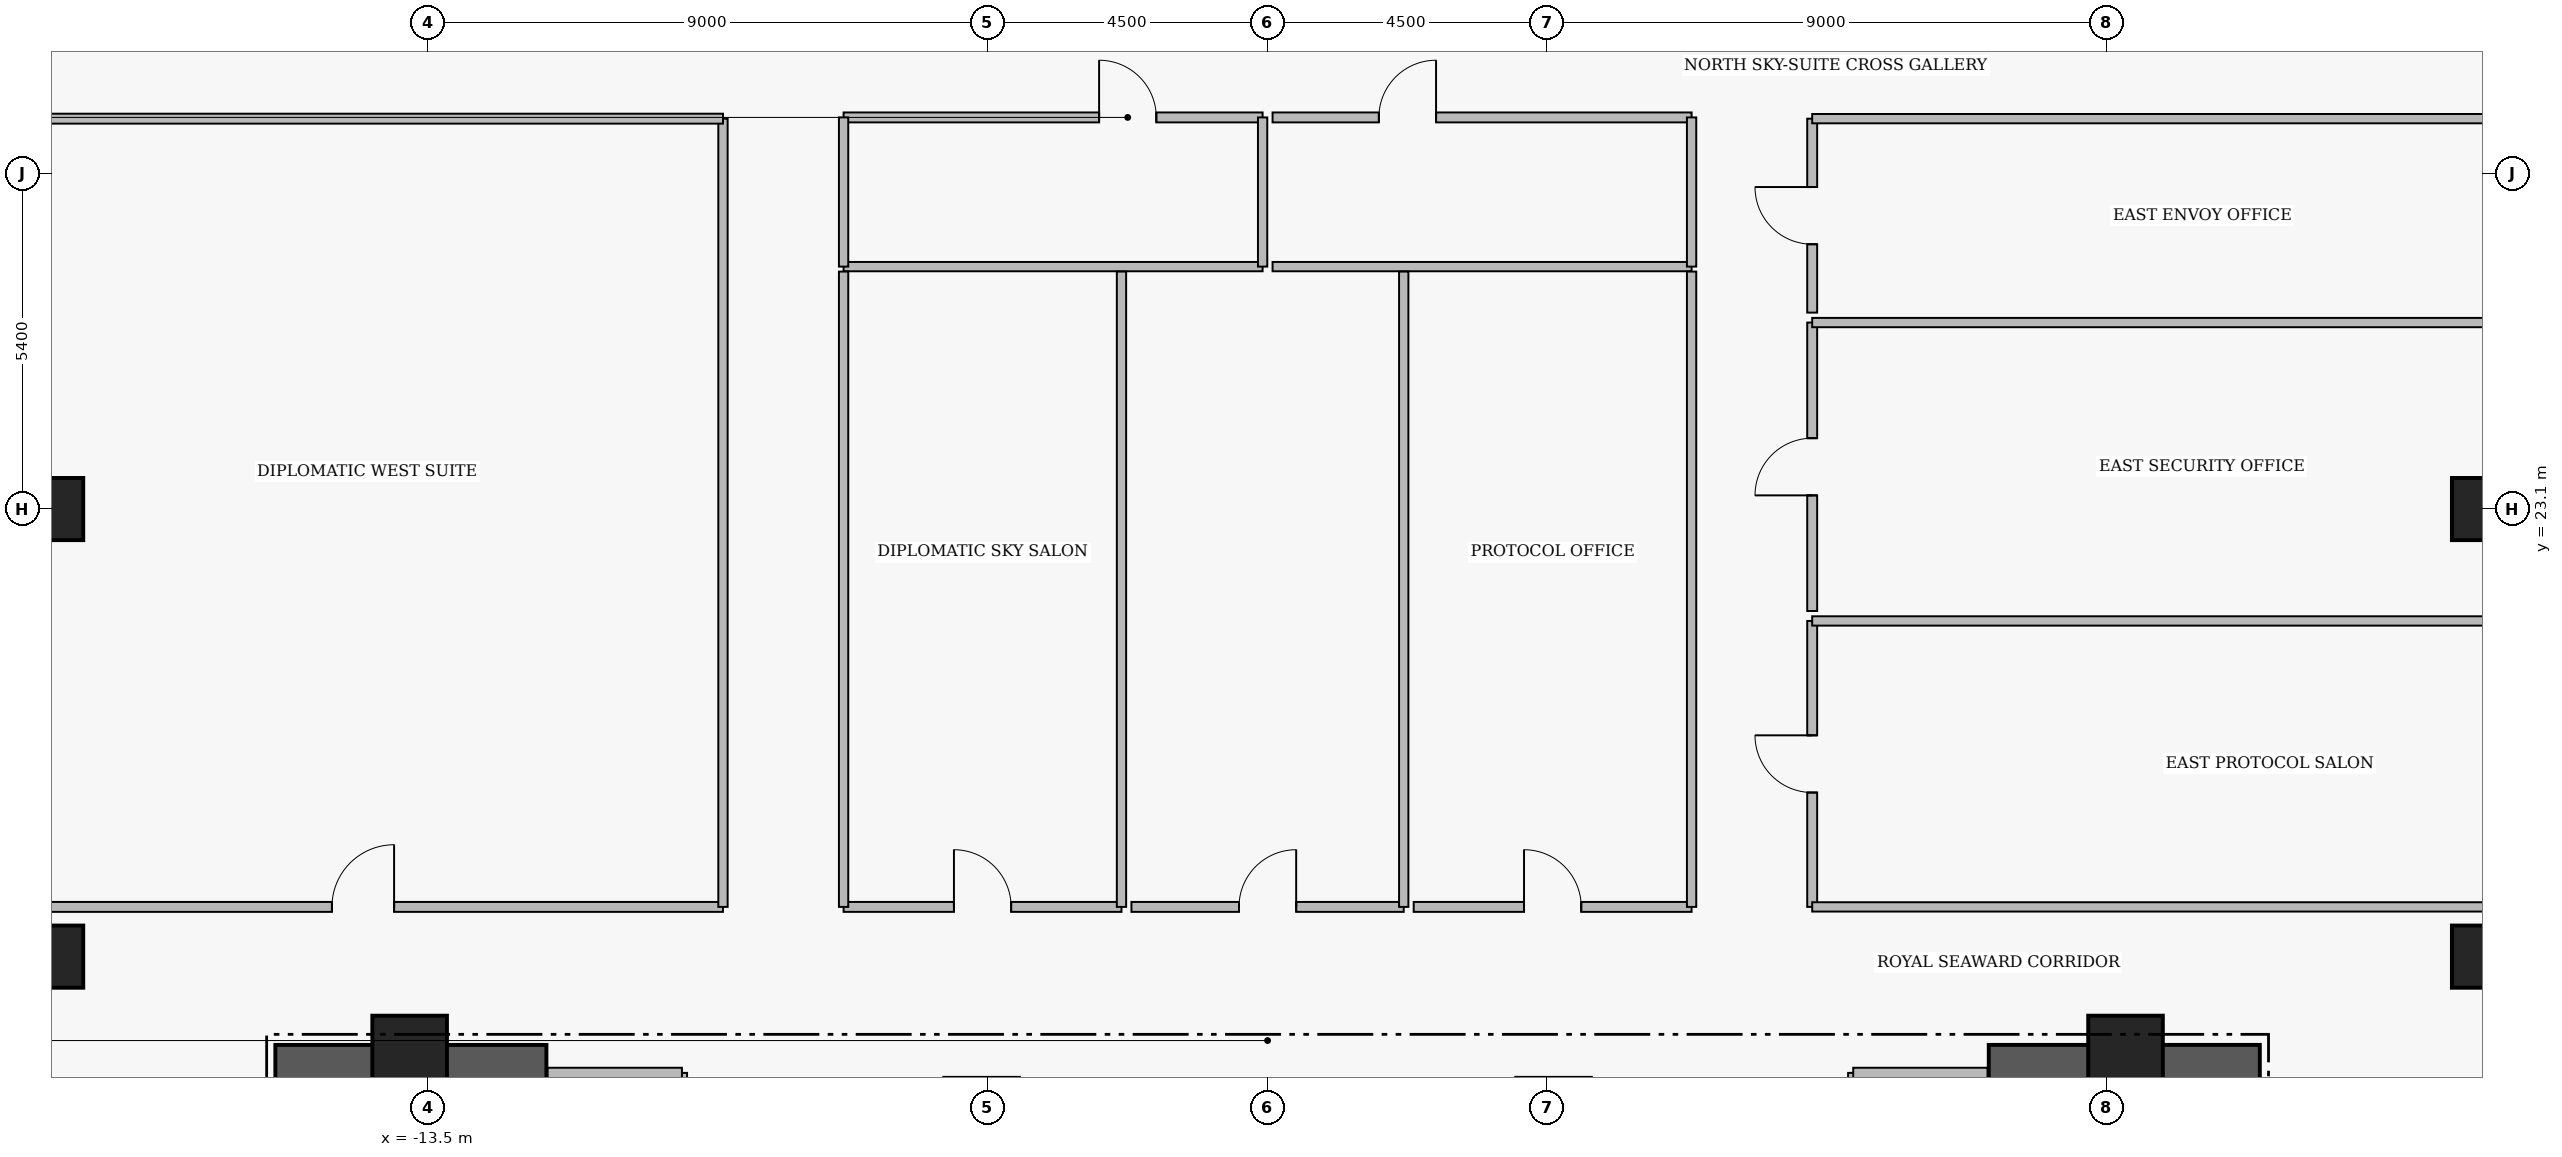
"""IFC4 building model, lengths in metres.
Left out: names, types, materials, properties, quantities, classifications, styles, units other than length and angle.
Written with IfcOpenShell. Run it as: python <this file> out.ifc"""

import sys

from ifc_helpers import new_model, si_unit, direction, frame, frame_2d, origin, origin_2d, place, context, subcontext, project, spatial, rectangle, extrude, element, fill, save


model = new_model("IFC4")
c1 = context("Model", 3, precision=1e-05, world=origin(), true_north=direction((0.0, 1.0)))
c2 = subcontext(c1, "Body", "Model", "MODEL_VIEW")
j1 = project(units=[si_unit("LENGTHUNIT", "METRE"), si_unit("PLANEANGLEUNIT", "RADIAN")], contexts=[c1])
p1 = place(None, origin())
s1 = spatial("IfcSite", under=j1, at=p1, CompositionType="ELEMENT")
p2 = place(p1, origin())
s2 = spatial("IfcBuilding", under=s1, at=p2, CompositionType="ELEMENT")
p3 = place(p2, frame((0.0, 0.0, 280.35)))
s3 = spatial("IfcBuildingStorey", under=s2, at=p3, CompositionType="ELEMENT", Elevation=280.35)
for number, where, z_axis, x_axis in (
    (1, (-15.96, 14.205, 0.0), (0.0, 0.0, 1.0), (1.0, 0.0, 0.0)),
    (2, (11.6, 14.205, 0.0), (0.0, 0.0, 1.0), (1.0, 0.0, 0.0)),
):
    element("IfcWall", number, at=place(p3, frame(where, z_axis=z_axis, x_axis=x_axis)), inside=s3, PredefinedType="SHEAR", context=c2, shape_type="SweptSolid", body=[
        extrude(rectangle(XDim=4.36, YDim=0.55, at=frame_2d((2.18, 0.0))), origin(), (0.0, 0.0, 1.0), 3.51),
    ])
for number, where, z_axis, x_axis in (
    (3, (-13.8, 14.35, 0.0), (0.0, 0.0, 1.0), (1.0, 0.0, 0.0)),
    (4, (-4.6, 13.35, 0.0), (0.0, 0.0, 1.0), (1.0, 0.0, 0.0)),
    (5, (4.6, 13.35, 0.0), (0.0, 0.0, 1.0), (1.0, 0.0, 0.0)),
    (6, (13.8, 14.35, 0.0), (0.0, 0.0, 1.0), (1.0, 0.0, 0.0)),
):
    element("IfcColumn", number, at=place(p3, frame(where, z_axis=z_axis, x_axis=x_axis)), inside=s3, PredefinedType="COLUMN", context=c2, shape_type="SweptSolid", body=[
        extrude(rectangle(XDim=1.2, YDim=1.2, at=origin_2d()), origin(), (0.0, 0.0, 1.0), 3.7),
    ])
for number, where, z_axis, x_axis in (
    (7, (-19.55, 15.9, 0.0), (0.0, 0.0, 1.0), (1.0, 0.0, 0.0)),
    (8, (-19.55, 23.1, 0.0), (0.0, 0.0, 1.0), (1.0, 0.0, 0.0)),
    (9, (19.55, 15.9, 0.0), (0.0, 0.0, 1.0), (1.0, 0.0, 0.0)),
    (10, (19.55, 23.1, 0.0), (0.0, 0.0, 1.0), (1.0, 0.0, 0.0)),
):
    element("IfcColumn", number, at=place(p3, frame(where, z_axis=z_axis, x_axis=x_axis)), inside=s3, PredefinedType="COLUMN", context=c2, shape_type="SweptSolid", body=[
        extrude(rectangle(XDim=1.0, YDim=1.0, at=origin_2d()), origin(), (0.0, 0.0, 1.0), 3.7),
    ])
p4 = place(p3, frame((-6.82, 29.4, 0.0), z_axis=(0.0, 0.0, 1.0), x_axis=(1.0, 0.0, 0.0)))
e11 = element("IfcWall", 11, at=p4, inside=s3, PredefinedType="PARTITIONING", context=c2, shape_type="SweptSolid", body=[
    extrude(rectangle(XDim=6.74, YDim=0.16, at=frame_2d((3.37, 0.0))), origin(), (0.0, 0.0, 1.0), 3.48),
])
p5 = place(p4, frame((4.11, 0.0, 0.0)))
e12 = element("IfcOpeningElement", 12, at=p5, cuts=e11, PredefinedType="OPENING", context=c2, shape_type="SweptSolid", body=[
    extrude(rectangle(XDim=0.92, YDim=2.12, at=frame_2d((0.46, 1.06))), frame((0.0, 0.09, 0.0), z_axis=(0.0, -1.0, 0.0), x_axis=(1.0, 0.0, 0.0)), (0.0, 0.0, 1.0), 0.18),
])
p6 = place(p3, frame((0.08, 29.4, 0.0), z_axis=(0.0, 0.0, 1.0), x_axis=(1.0, 0.0, 0.0)))
e13 = element("IfcWall", 13, at=p6, inside=s3, PredefinedType="PARTITIONING", context=c2, shape_type="SweptSolid", body=[
    extrude(rectangle(XDim=6.74, YDim=0.16, at=frame_2d((3.37, 0.0))), origin(), (0.0, 0.0, 1.0), 3.48),
])
p7 = place(p6, frame((1.71, 0.0, 0.0)))
e14 = element("IfcOpeningElement", 14, at=p7, cuts=e13, PredefinedType="OPENING", context=c2, shape_type="SweptSolid", body=[
    extrude(rectangle(XDim=0.92, YDim=2.12, at=frame_2d((0.46, 1.06))), frame((0.0, 0.09, 0.0), z_axis=(0.0, -1.0, 0.0), x_axis=(1.0, 0.0, 0.0)), (0.0, 0.0, 1.0), 0.18),
])
p8 = place(p3, frame((-6.82, 16.7, 0.0), z_axis=(0.0, 0.0, 1.0), x_axis=(1.0, 0.0, 0.0)))
e15 = element("IfcWall", 15, at=p8, inside=s3, PredefinedType="PARTITIONING", context=c2, shape_type="SweptSolid", body=[
    extrude(rectangle(XDim=4.47, YDim=0.16, at=frame_2d((2.235, 0.0))), origin(), (0.0, 0.0, 1.0), 3.076),
])
p9 = place(p8, frame((1.775, 0.0, 0.0)))
e16 = element("IfcOpeningElement", 16, at=p9, cuts=e15, PredefinedType="OPENING", context=c2, shape_type="SweptSolid", body=[
    extrude(rectangle(XDim=0.92, YDim=2.12, at=frame_2d((0.46, 1.06))), frame((0.0, 0.09, 0.0), z_axis=(0.0, -1.0, 0.0), x_axis=(1.0, 0.0, 0.0)), (0.0, 0.0, 1.0), 0.18),
])
p10 = place(p3, frame((-2.19, 16.7, 0.0), z_axis=(0.0, 0.0, 1.0), x_axis=(1.0, 0.0, 0.0)))
e17 = element("IfcWall", 17, at=p10, inside=s3, PredefinedType="PARTITIONING", context=c2, shape_type="SweptSolid", body=[
    extrude(rectangle(XDim=4.38, YDim=0.16, at=frame_2d((2.19, 0.0))), origin(), (0.0, 0.0, 1.0), 3.076),
])
p11 = place(p10, frame((1.73, 0.0, 0.0)))
e18 = element("IfcOpeningElement", 18, at=p11, cuts=e17, PredefinedType="OPENING", context=c2, shape_type="SweptSolid", body=[
    extrude(rectangle(XDim=0.92, YDim=2.12, at=frame_2d((0.46, 1.06))), frame((0.0, 0.09, 0.0), z_axis=(0.0, -1.0, 0.0), x_axis=(1.0, 0.0, 0.0)), (0.0, 0.0, 1.0), 0.18),
])
p12 = place(p3, frame((2.35, 16.7, 0.0), z_axis=(0.0, 0.0, 1.0), x_axis=(1.0, 0.0, 0.0)))
e19 = element("IfcWall", 19, at=p12, inside=s3, PredefinedType="PARTITIONING", context=c2, shape_type="SweptSolid", body=[
    extrude(rectangle(XDim=4.47, YDim=0.16, at=frame_2d((2.235, 0.0))), origin(), (0.0, 0.0, 1.0), 3.076),
])
p13 = place(p12, frame((1.775, 0.0, 0.0)))
e20 = element("IfcOpeningElement", 20, at=p13, cuts=e19, PredefinedType="OPENING", context=c2, shape_type="SweptSolid", body=[
    extrude(rectangle(XDim=0.92, YDim=2.12, at=frame_2d((0.46, 1.06))), frame((0.0, 0.09, 0.0), z_axis=(0.0, -1.0, 0.0), x_axis=(1.0, 0.0, 0.0)), (0.0, 0.0, 1.0), 0.18),
])
p14 = place(p3, frame((8.76, 16.7, 0.0), z_axis=(0.0, 0.0, 1.0), x_axis=(0.0, 1.0, 0.0)))
e21 = element("IfcWall", 21, at=p14, inside=s3, PredefinedType="PARTITIONING", context=c2, shape_type="SweptSolid", body=[
    extrude(rectangle(XDim=4.6, YDim=0.16, at=frame_2d((2.3, 0.0))), origin(), (0.0, 0.0, 1.0), 3.48),
])
p15 = place(p14, frame((1.84, 0.0, 0.0)))
e22 = element("IfcOpeningElement", 22, at=p15, cuts=e21, PredefinedType="OPENING", context=c2, shape_type="SweptSolid", body=[
    extrude(rectangle(XDim=0.92, YDim=2.12, at=frame_2d((0.46, 1.06))), frame((0.0, 0.09, 0.0), z_axis=(0.0, -1.0, 0.0), x_axis=(1.0, 0.0, 0.0)), (0.0, 0.0, 1.0), 0.18),
])
p16 = place(p3, frame((8.76, 21.46, 0.0), z_axis=(0.0, 0.0, 1.0), x_axis=(0.0, 1.0, 0.0)))
e23 = element("IfcWall", 23, at=p16, inside=s3, PredefinedType="PARTITIONING", context=c2, shape_type="SweptSolid", body=[
    extrude(rectangle(XDim=4.64, YDim=0.16, at=frame_2d((2.32, 0.0))), origin(), (0.0, 0.0, 1.0), 3.48),
])
p17 = place(p16, frame((1.86, 0.0, 0.0)))
e24 = element("IfcOpeningElement", 24, at=p17, cuts=e23, PredefinedType="OPENING", context=c2, shape_type="SweptSolid", body=[
    extrude(rectangle(XDim=0.92, YDim=2.12, at=frame_2d((0.46, 1.06))), frame((0.0, 0.09, 0.0), z_axis=(0.0, -1.0, 0.0), x_axis=(1.0, 0.0, 0.0)), (0.0, 0.0, 1.0), 0.18),
])
p18 = place(p3, frame((8.76, 26.26, 0.0), z_axis=(0.0, 0.0, 1.0), x_axis=(0.0, 1.0, 0.0)))
e25 = element("IfcWall", 25, at=p18, inside=s3, PredefinedType="PARTITIONING", context=c2, shape_type="SweptSolid", body=[
    extrude(rectangle(XDim=3.12, YDim=0.16, at=frame_2d((1.56, 0.0))), origin(), (0.0, 0.0, 1.0), 3.48),
])
p19 = place(p18, frame((1.1, 0.0, 0.0)))
e26 = element("IfcOpeningElement", 26, at=p19, cuts=e25, PredefinedType="OPENING", context=c2, shape_type="SweptSolid", body=[
    extrude(rectangle(XDim=0.92, YDim=2.12, at=frame_2d((0.46, 1.06))), frame((0.0, 0.09, 0.0), z_axis=(0.0, -1.0, 0.0), x_axis=(1.0, 0.0, 0.0)), (0.0, 0.0, 1.0), 0.18),
])
p20 = place(p3, frame((-22.64, 16.7, 0.0), z_axis=(0.0, 0.0, 1.0), x_axis=(1.0, 0.0, 0.0)))
e27 = element("IfcWall", 27, at=p20, inside=s3, PredefinedType="PARTITIONING", context=c2, shape_type="SweptSolid", body=[
    extrude(rectangle(XDim=13.88, YDim=0.16, at=frame_2d((6.94, 0.0))), origin(), (0.0, 0.0, 1.0), 3.076),
])
p21 = place(p20, frame((7.59, 0.0, 0.0)))
e28 = element("IfcOpeningElement", 28, at=p21, cuts=e27, PredefinedType="OPENING", context=c2, shape_type="SweptSolid", body=[
    extrude(rectangle(XDim=1.0, YDim=2.15, at=frame_2d((0.5, 1.075))), frame((0.0, 0.09, 0.0), z_axis=(0.0, -1.0, 0.0), x_axis=(1.0, 0.0, 0.0)), (0.0, 0.0, 1.0), 0.18),
])
p22 = place(p3, frame((-9.42, 11.07, 0.0), z_axis=(0.0, 0.0, 1.0), x_axis=(0.0, 1.0, 0.0)))
e29 = element("IfcWall", 29, at=p22, inside=s3, PredefinedType="PARTITIONING", context=c2, shape_type="SweptSolid", body=[
    extrude(rectangle(XDim=2.96, YDim=0.165, at=frame_2d((1.48, 0.0))), origin(), (0.0, 0.0, 1.0), 3.48),
])
p23 = place(p3, frame((-11.58, 14.03, 0.0), z_axis=(0.0, 0.0, 1.0), x_axis=(1.0, 0.0, 0.0)))
e30 = element("IfcWall", 30, at=p23, inside=s3, PredefinedType="PARTITIONING", context=c2, shape_type="SweptSolid", body=[
    extrude(rectangle(XDim=2.16, YDim=0.165, at=frame_2d((1.08, 0.0))), origin(), (0.0, 0.0, 1.0), 3.48),
])
p24 = place(p3, frame((9.42, 11.07, 0.0), z_axis=(0.0, 0.0, 1.0), x_axis=(0.0, 1.0, 0.0)))
e31 = element("IfcWall", 31, at=p24, inside=s3, PredefinedType="PARTITIONING", context=c2, shape_type="SweptSolid", body=[
    extrude(rectangle(XDim=2.96, YDim=0.165, at=frame_2d((1.48, 0.0))), origin(), (0.0, 0.0, 1.0), 3.48),
])
p25 = place(p3, frame((9.42, 14.03, 0.0), z_axis=(0.0, 0.0, 1.0), x_axis=(1.0, 0.0, 0.0)))
e32 = element("IfcWall", 32, at=p25, inside=s3, PredefinedType="PARTITIONING", context=c2, shape_type="SweptSolid", body=[
    extrude(rectangle(XDim=2.16, YDim=0.165, at=frame_2d((1.08, 0.0))), origin(), (0.0, 0.0, 1.0), 3.48),
])
p26 = place(p3, frame((-6.82, 27.0, 0.0), z_axis=(0.0, 0.0, 1.0), x_axis=(1.0, 0.0, 0.0)))
e33 = element("IfcWall", 33, at=p26, inside=s3, PredefinedType="PARTITIONING", context=c2, shape_type="SweptSolid", body=[
    extrude(rectangle(XDim=6.74, YDim=0.15, at=frame_2d((3.37, 0.0))), origin(), (0.0, 0.0, 1.0), 3.48),
])
for number, where, z_axis, x_axis in (
    (34, (-6.82, 27.0, 0.0), (0.0, 0.0, 1.0), (0.0, 1.0, 0.0)),
    (35, (-0.08, 27.0, 0.0), (0.0, 0.0, 1.0), (0.0, 1.0, 0.0)),
):
    element("IfcWall", number, at=place(p3, frame(where, z_axis=z_axis, x_axis=x_axis)), inside=s3, PredefinedType="PARTITIONING", context=c2, shape_type="SweptSolid", body=[
        extrude(rectangle(XDim=2.4, YDim=0.15, at=frame_2d((1.2, 0.0))), origin(), (0.0, 0.0, 1.0), 3.48),
    ])
p27 = place(p3, frame((0.08, 27.0, 0.0), z_axis=(0.0, 0.0, 1.0), x_axis=(1.0, 0.0, 0.0)))
e36 = element("IfcWall", 36, at=p27, inside=s3, PredefinedType="PARTITIONING", context=c2, shape_type="SweptSolid", body=[
    extrude(rectangle(XDim=6.74, YDim=0.15, at=frame_2d((3.37, 0.0))), origin(), (0.0, 0.0, 1.0), 3.48),
])
p28 = place(p3, frame((6.82, 27.0, 0.0), z_axis=(0.0, 0.0, 1.0), x_axis=(0.0, 1.0, 0.0)))
e37 = element("IfcWall", 37, at=p28, inside=s3, PredefinedType="PARTITIONING", context=c2, shape_type="SweptSolid", body=[
    extrude(rectangle(XDim=2.4, YDim=0.15, at=frame_2d((1.2, 0.0))), origin(), (0.0, 0.0, 1.0), 3.48),
])
for number, where, z_axis, x_axis in (
    (38, (-6.82, 16.7, 0.0), (0.0, 0.0, 1.0), (0.0, 1.0, 0.0)),
    (39, (-2.35, 16.7, 0.0), (0.0, 0.0, 1.0), (0.0, 1.0, 0.0)),
    (40, (2.19, 16.7, 0.0), (0.0, 0.0, 1.0), (0.0, 1.0, 0.0)),
    (41, (6.82, 16.7, 0.0), (0.0, 0.0, 1.0), (0.0, 1.0, 0.0)),
):
    element("IfcWall", number, at=place(p3, frame(where, z_axis=z_axis, x_axis=x_axis)), inside=s3, PredefinedType="PARTITIONING", context=c2, shape_type="SweptSolid", body=[
        extrude(rectangle(XDim=10.22, YDim=0.15, at=frame_2d((5.11, 0.0))), origin(), (0.0, 0.0, 1.0), 3.48),
    ])
p29 = place(p3, frame((8.76, 16.7, 0.0), z_axis=(0.0, 0.0, 1.0), x_axis=(1.0, 0.0, 0.0)))
e42 = element("IfcWall", 42, at=p29, inside=s3, PredefinedType="PARTITIONING", context=c2, shape_type="SweptSolid", body=[
    extrude(rectangle(XDim=12.358, YDim=0.15, at=frame_2d((6.179, 0.0))), origin(), (0.0, 0.0, 1.0), 3.076),
])
p30 = place(p3, frame((8.76, 21.3, 0.0), z_axis=(0.0, 0.0, 1.0), x_axis=(1.0, 0.0, 0.0)))
e43 = element("IfcWall", 43, at=p30, inside=s3, PredefinedType="PARTITIONING", context=c2, shape_type="SweptSolid", body=[
    extrude(rectangle(XDim=12.902, YDim=0.15, at=frame_2d((6.451, 0.0))), origin(), (0.0, 0.0, 1.0), 3.48),
])
for number, where, z_axis, x_axis in (
    (44, (8.76, 26.1, 0.0), (0.0, 0.0, 1.0), (1.0, 0.0, 0.0)),
    (45, (8.76, 29.38, 0.0), (0.0, 0.0, 1.0), (1.0, 0.0, 0.0)),
):
    element("IfcWall", number, at=place(p3, frame(where, z_axis=z_axis, x_axis=x_axis)), inside=s3, PredefinedType="PARTITIONING", context=c2, shape_type="SweptSolid", body=[
        extrude(rectangle(XDim=11.38, YDim=0.15, at=frame_2d((5.69, 0.0))), origin(), (0.0, 0.0, 1.0), 3.48),
    ])
p31 = place(p3, frame((-8.76, 16.7, 0.0), z_axis=(0.0, 0.0, 1.0), x_axis=(0.0, 1.0, 0.0)))
e46 = element("IfcWall", 46, at=p31, inside=s3, PredefinedType="PARTITIONING", context=c2, shape_type="SweptSolid", body=[
    extrude(rectangle(XDim=12.68, YDim=0.15, at=frame_2d((6.34, 0.0))), origin(), (0.0, 0.0, 1.0), 3.48),
])
p32 = place(p3, frame((-22.64, 29.38, 0.0), z_axis=(0.0, 0.0, 1.0), x_axis=(1.0, 0.0, 0.0)))
e47 = element("IfcWall", 47, at=p32, inside=s3, PredefinedType="PARTITIONING", context=c2, shape_type="SweptSolid", body=[
    extrude(rectangle(XDim=13.88, YDim=0.16, at=frame_2d((6.94, 0.0))), origin(), (0.0, 0.0, 1.0), 3.48),
])
p33 = place(p5, origin())
e48 = element("IfcDoor", 48, at=p33, inside=s3, OperationType="SINGLE_SWING_LEFT", PredefinedType="DOOR", context=c2, shape_type="SweptSolid", body=[
    extrude(rectangle(XDim=0.92, YDim=2.12, at=frame_2d((0.46, 1.06))), frame((0.0, 0.025, 0.0), z_axis=(0.0, -1.0, 0.0), x_axis=(1.0, 0.0, 0.0)), (0.0, 0.0, 1.0), 0.05),
])
fill(e12, e48)
p34 = place(p7, origin())
e49 = element("IfcDoor", 49, at=p34, inside=s3, OperationType="SINGLE_SWING_RIGHT", PredefinedType="DOOR", context=c2, shape_type="SweptSolid", body=[
    extrude(rectangle(XDim=0.92, YDim=2.12, at=frame_2d((0.46, 1.06))), frame((0.0, 0.025, 0.0), z_axis=(0.0, -1.0, 0.0), x_axis=(1.0, 0.0, 0.0)), (0.0, 0.0, 1.0), 0.05),
])
fill(e14, e49)
p35 = place(p9, origin())
e50 = element("IfcDoor", 50, at=p35, inside=s3, OperationType="SINGLE_SWING_LEFT", PredefinedType="DOOR", context=c2, shape_type="SweptSolid", body=[
    extrude(rectangle(XDim=0.92, YDim=2.12, at=frame_2d((0.46, 1.06))), frame((0.0, 0.025, 0.0), z_axis=(0.0, -1.0, 0.0), x_axis=(1.0, 0.0, 0.0)), (0.0, 0.0, 1.0), 0.05),
])
fill(e16, e50)
p36 = place(p11, origin())
e51 = element("IfcDoor", 51, at=p36, inside=s3, OperationType="SINGLE_SWING_RIGHT", PredefinedType="DOOR", context=c2, shape_type="SweptSolid", body=[
    extrude(rectangle(XDim=0.92, YDim=2.12, at=frame_2d((0.46, 1.06))), frame((0.0, 0.025, 0.0), z_axis=(0.0, -1.0, 0.0), x_axis=(1.0, 0.0, 0.0)), (0.0, 0.0, 1.0), 0.05),
])
fill(e18, e51)
p37 = place(p13, origin())
e52 = element("IfcDoor", 52, at=p37, inside=s3, OperationType="SINGLE_SWING_LEFT", PredefinedType="DOOR", context=c2, shape_type="SweptSolid", body=[
    extrude(rectangle(XDim=0.92, YDim=2.12, at=frame_2d((0.46, 1.06))), frame((0.0, 0.025, 0.0), z_axis=(0.0, -1.0, 0.0), x_axis=(1.0, 0.0, 0.0)), (0.0, 0.0, 1.0), 0.05),
])
fill(e20, e52)
p38 = place(p15, origin())
e53 = element("IfcDoor", 53, at=p38, inside=s3, OperationType="SINGLE_SWING_RIGHT", PredefinedType="DOOR", context=c2, shape_type="SweptSolid", body=[
    extrude(rectangle(XDim=0.92, YDim=2.12, at=frame_2d((0.46, 1.06))), frame((0.0, 0.025, 0.0), z_axis=(0.0, -1.0, 0.0), x_axis=(1.0, 0.0, 0.0)), (0.0, 0.0, 1.0), 0.05),
])
fill(e22, e53)
p39 = place(p17, origin())
e54 = element("IfcDoor", 54, at=p39, inside=s3, OperationType="SINGLE_SWING_LEFT", PredefinedType="DOOR", context=c2, shape_type="SweptSolid", body=[
    extrude(rectangle(XDim=0.92, YDim=2.12, at=frame_2d((0.46, 1.06))), frame((0.0, 0.025, 0.0), z_axis=(0.0, -1.0, 0.0), x_axis=(1.0, 0.0, 0.0)), (0.0, 0.0, 1.0), 0.05),
])
fill(e24, e54)
p40 = place(p19, origin())
e55 = element("IfcDoor", 55, at=p40, inside=s3, OperationType="SINGLE_SWING_RIGHT", PredefinedType="DOOR", context=c2, shape_type="SweptSolid", body=[
    extrude(rectangle(XDim=0.92, YDim=2.12, at=frame_2d((0.46, 1.06))), frame((0.0, 0.025, 0.0), z_axis=(0.0, -1.0, 0.0), x_axis=(1.0, 0.0, 0.0)), (0.0, 0.0, 1.0), 0.05),
])
fill(e26, e55)
p41 = place(p21, origin())
e56 = element("IfcDoor", 56, at=p41, inside=s3, OperationType="SINGLE_SWING_RIGHT", PredefinedType="DOOR", context=c2, shape_type="SweptSolid", body=[
    extrude(rectangle(XDim=1.0, YDim=2.15, at=frame_2d((0.5, 1.075))), frame((0.0, 0.025, 0.0), z_axis=(0.0, -1.0, 0.0), x_axis=(1.0, 0.0, 0.0)), (0.0, 0.0, 1.0), 0.05),
])
fill(e28, e56)
save(model, sys.argv[1])
